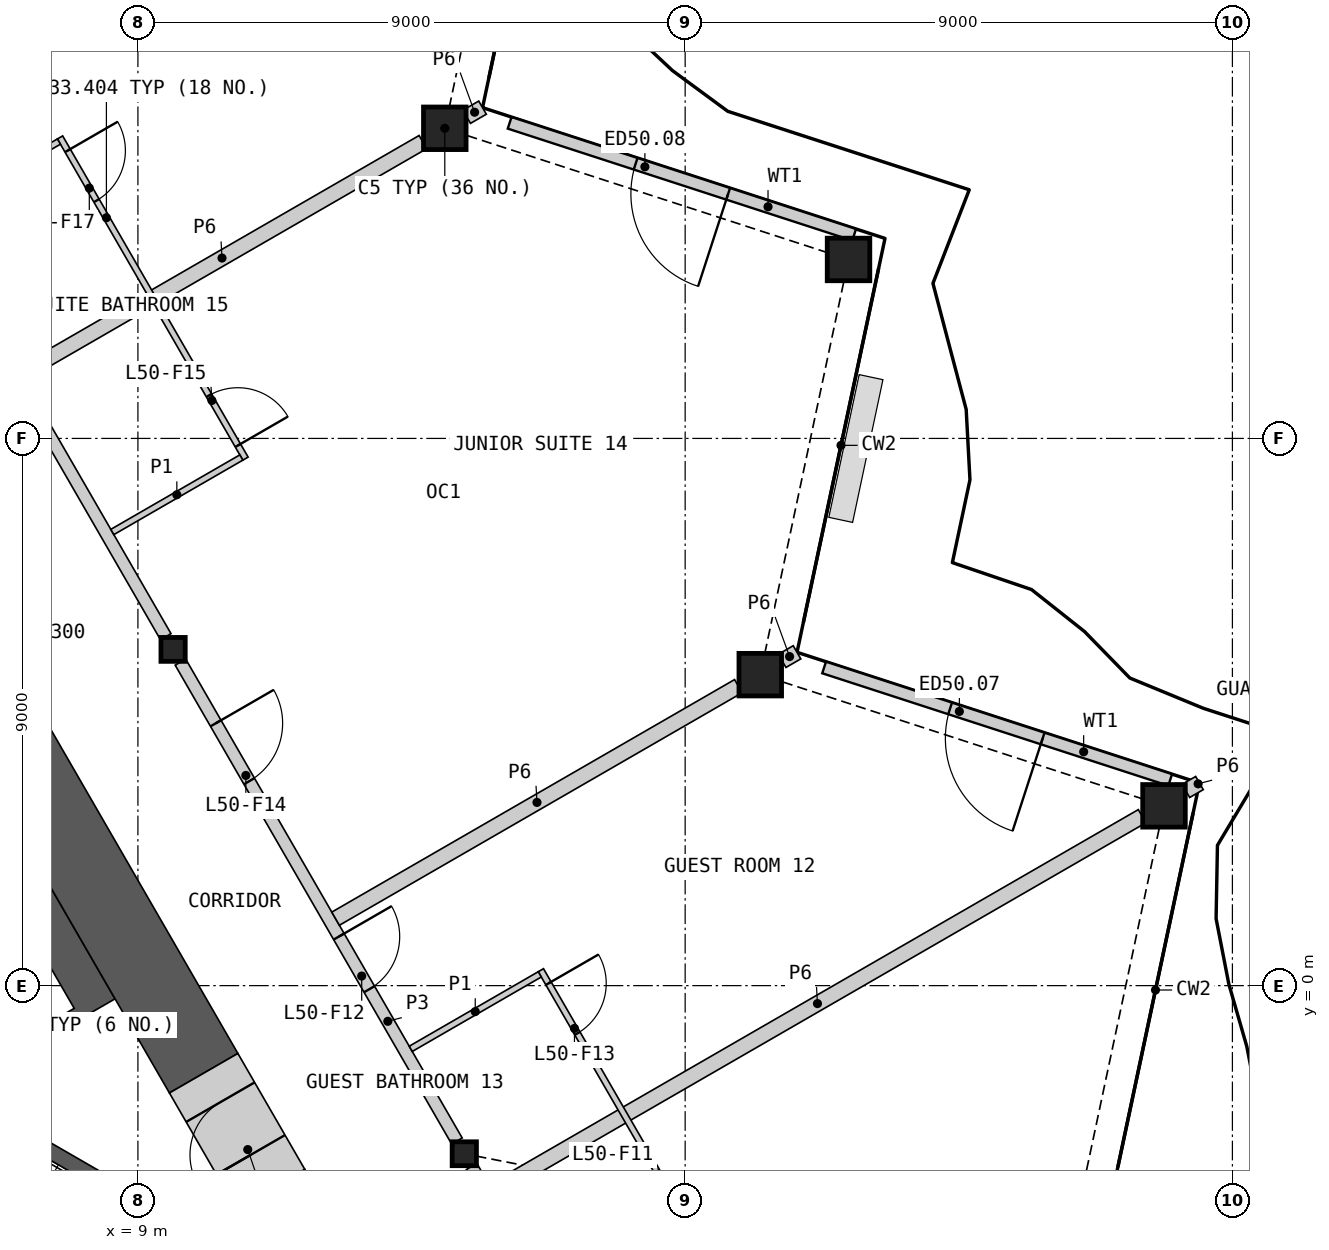
"""IFC4 building model, lengths in metres.
Left out: names, types, materials, properties, quantities, classifications, styles, units other than length and angle.
Written with IfcOpenShell. Run it as: python <this file> out.ifc"""

import sys

from ifc_helpers import new_model, si_unit, direction, frame, frame_2d, origin, origin_2d, place, context, subcontext, project, spatial, polyline, rectangle, hollow_rectangle, i_section, outline, extrude, element, fill, save


model = new_model("IFC4")
c1 = context("Model", 3, precision=1e-05, world=origin(), true_north=direction((0.0, 1.0)))
c2 = subcontext(c1, "Body", "Model", "MODEL_VIEW")
j1 = project(units=[si_unit("LENGTHUNIT", "METRE"), si_unit("PLANEANGLEUNIT", "RADIAN")], contexts=[c1])
p1 = place(None, origin())
s1 = spatial("IfcSite", under=j1, at=p1, CompositionType="ELEMENT")
p2 = place(p1, origin())
s2 = spatial("IfcBuilding", under=s1, at=p2, CompositionType="ELEMENT")
p3 = place(p2, frame((0.0, 0.0, 231.0)))
s3 = spatial("IfcBuildingStorey", under=s2, at=p3, CompositionType="ELEMENT", Elevation=231.0)
for number, where, z_axis, x_axis in (
    (1, (25.875, 2.957, 0.0), (0.0, 0.0, 1.0), (1.0, 0.0, 0.0)),
    (2, (19.235, 5.115, 0.0), (0.0, 0.0, 1.0), (1.0, 0.0, 0.0)),
    (3, (20.687, 11.943, 0.0), (0.0, 0.0, 1.0), (1.0, 0.0, 0.0)),
    (4, (14.047, 14.101, 0.0), (0.0, 0.0, 1.0), (1.0, 0.0, 0.0)),
):
    element("IfcColumn", number, at=place(p3, frame(where, z_axis=z_axis, x_axis=x_axis)), inside=s3, PredefinedType="COLUMN", context=c2, shape_type="SweptSolid", body=[
        extrude(hollow_rectangle(XDim=0.7, YDim=0.7, WallThickness=0.045, at=origin_2d()), origin(), (0.0, 0.0, 1.0), 3.6),
    ])
for number, where, z_axis, x_axis in (
    (5, (14.368, -2.765, 0.0), (0.0, 0.0, 1.0), (1.0, 0.0, 0.0)),
    (6, (9.578, 5.53, 0.0), (0.0, 0.0, 1.0), (1.0, 0.0, 0.0)),
):
    element("IfcColumn", number, at=place(p3, frame(where, z_axis=z_axis, x_axis=x_axis)), inside=s3, PredefinedType="COLUMN", context=c2, shape_type="SweptSolid", body=[
        extrude(i_section(OverallWidth=0.399, OverallDepth=0.393, WebThickness=0.023, FlangeThickness=0.037, at=origin_2d()), origin(), (0.0, 0.0, 1.0), 3.6),
    ])
p4 = place(p3, frame((25.977, 3.383, 0.0), z_axis=(0.0, 0.0, 1.0), x_axis=(-0.951062846307, 0.308997511922, 0.0)))
e7 = element("IfcWall", 7, at=p4, inside=s3, PredefinedType="SOLIDWALL", context=c2, shape_type="SweptSolid", body=[
    extrude(rectangle(XDim=5.984, YDim=0.2, at=frame_2d((2.992, 0.0))), origin(), (0.0, 0.0, 1.0), 2.701),
])
p5 = place(p4, frame((2.206, 0.0, 0.0)))
e8 = element("IfcOpeningElement", 8, at=p5, cuts=e7, PredefinedType="OPENING", context=c2, shape_type="SweptSolid", body=[
    extrude(rectangle(XDim=1.6, YDim=2.4, at=frame_2d((0.8, 1.2))), frame((0.0, 0.11, 0.0), z_axis=(0.0, -1.0, 0.0), x_axis=(1.0, 0.0, 0.0)), (0.0, 0.0, 1.0), 0.22),
])
p6 = place(p3, frame((20.779, 12.35, 0.0), z_axis=(0.0, 0.0, 1.0), x_axis=(-0.951065383831, 0.308989701572, 0.0)))
e9 = element("IfcWall", 9, at=p6, inside=s3, PredefinedType="SOLIDWALL", context=c2, shape_type="SweptSolid", body=[
    extrude(rectangle(XDim=5.958, YDim=0.2, at=frame_2d((2.979, 0.0))), origin(), (0.0, 0.0, 1.0), 2.701),
])
p7 = place(p6, frame((2.179, 0.0, 0.0)))
e10 = element("IfcOpeningElement", 10, at=p7, cuts=e9, PredefinedType="OPENING", context=c2, shape_type="SweptSolid", body=[
    extrude(rectangle(XDim=1.6, YDim=2.4, at=frame_2d((0.8, 1.2))), frame((0.0, 0.11, 0.0), z_axis=(0.0, -1.0, 0.0), x_axis=(1.0, 0.0, 0.0)), (0.0, 0.0, 1.0), 0.22),
])
p8 = place(p3, origin())
e11 = element("IfcWall", 11, at=p8, inside=s3, PredefinedType="SHEAR", context=c2, shape_type="SweptSolid", body=[
    extrude(outline(polyline([(6.324, 3.767), (8.624, -0.217), (8.231, -0.444), (6.061, -1.697), (5.96, -1.524), (7.952, -0.374), (5.852, 3.263), (3.861, 2.113), (3.76, 2.287), (5.931, 3.54), (6.324, 3.767)])), origin(), (0.0, 0.0, 1.0), 3.25),
])
p9 = place(p3, origin())
e12 = element("IfcWall", 12, at=p9, inside=s3, PredefinedType="SHEAR", context=c2, shape_type="SweptSolid", body=[
    extrude(outline(polyline([(10.032, -4.298), (10.374, -4.206), (5.307, -1.281), (5.182, -1.498), (10.032, -4.298)])), origin(), (0.0, 0.0, 1.0), 3.25),
])
p10 = place(p3, frame((10.081, -1.441, 0.0), z_axis=(0.0, 0.0, 1.0), x_axis=(-0.500012180433, 0.866018371294, 0.0)))
e13 = element("IfcWall", 13, at=p10, inside=s3, PredefinedType="SHEAR", context=c2, shape_type="SweptSolid", body=[
    extrude(rectangle(XDim=15.05, YDim=1.3, at=frame_2d((7.525, 0.0))), origin(), (0.0, 0.0, 1.0), 3.25),
])
p11 = place(p3, frame((13.311, -7.035, 0.0), z_axis=(0.0, 0.0, 1.0), x_axis=(-0.500003555838, 0.866023350811, 0.0)))
e14 = element("IfcWall", 14, at=p11, inside=s3, PredefinedType="SHEAR", context=c2, shape_type="SweptSolid", body=[
    extrude(rectangle(XDim=4.26, YDim=1.3, at=frame_2d((2.13, 0.0))), origin(), (0.0, 0.0, 1.0), 3.25),
])
p12 = place(p3, frame((11.181, -3.346, 0.0), z_axis=(0.0, 0.0, 1.0), x_axis=(-0.499946605688, 0.86605622881, 0.0)))
e15 = element("IfcWall", 15, at=p12, inside=s3, PredefinedType="SHEAR", context=c2, shape_type="SweptSolid", body=[
    extrude(rectangle(XDim=2.2, YDim=1.3, at=frame_2d((1.1, 0.0))), origin(), (0.0, 0.0, 1.0), 3.25),
])
p13 = place(p12, frame((0.65, 0.0, 0.0)))
e16 = element("IfcOpeningElement", 16, at=p13, cuts=e15, PredefinedType="OPENING", context=c2, shape_type="SweptSolid", body=[
    extrude(rectangle(XDim=1.0, YDim=2.1, at=frame_2d((0.5, 1.05))), frame((0.0, 0.66, 0.0), z_axis=(0.0, -1.0, 0.0), x_axis=(1.0, 0.0, 0.0)), (0.0, 0.0, 1.0), 1.32),
])
p14 = place(p3, frame((14.837, -3.378, 0.0), z_axis=(0.0, 0.0, 1.0), x_axis=(0.866021706022, 0.500006404657, 0.0)))
e17 = element("IfcWall", 17, at=p14, inside=s3, PredefinedType="PARTITIONING", context=c2, shape_type="SweptSolid", body=[
    extrude(rectangle(XDim=12.33, YDim=0.25, at=frame_2d((6.165, 0.0))), origin(), (0.0, 0.0, 1.0), 2.404),
])
p15 = place(p3, frame((9.699, 5.321, 0.0), z_axis=(0.0, 0.0, 1.0), x_axis=(0.49998193945, -0.866035830797, 0.0)))
e18 = element("IfcWall", 18, at=p15, inside=s3, PredefinedType="PARTITIONING", context=c2, shape_type="SweptSolid", body=[
    extrude(rectangle(XDim=9.094, YDim=0.2, at=frame_2d((4.547, 0.0))), origin(), (0.0, 0.0, 1.0), 3.25),
])
p16 = place(p15, frame((5.212, 0.0, 0.0)))
e19 = element("IfcOpeningElement", 19, at=p16, cuts=e18, PredefinedType="OPENING", context=c2, shape_type="SweptSolid", body=[
    extrude(rectangle(XDim=1.0, YDim=2.1, at=frame_2d((0.5, 1.05))), frame((0.0, 0.11, 0.0), z_axis=(0.0, -1.0, 0.0), x_axis=(1.0, 0.0, 0.0)), (0.0, 0.0, 1.0), 0.22),
])
p17 = place(p15, frame((1.162, 0.0, 0.0)))
e20 = element("IfcOpeningElement", 20, at=p17, cuts=e18, PredefinedType="OPENING", context=c2, shape_type="SweptSolid", body=[
    extrude(rectangle(XDim=1.1, YDim=2.1, at=frame_2d((0.55, 1.05))), frame((0.0, 0.11, 0.0), z_axis=(0.0, -1.0, 0.0), x_axis=(1.0, 0.0, 0.0)), (0.0, 0.0, 1.0), 0.22),
])
p18 = place(p3, frame((4.91, 13.616, 0.0), z_axis=(0.0, 0.0, 1.0), x_axis=(0.50000207303, -0.866024206917, 0.0)))
e21 = element("IfcWall", 21, at=p18, inside=s3, PredefinedType="PARTITIONING", context=c2, shape_type="SweptSolid", body=[
    extrude(rectangle(XDim=9.095, YDim=0.2, at=frame_2d((4.547, 0.0))), origin(), (0.0, 0.0, 1.0), 3.25),
])
p19 = place(p3, frame((12.251, 1.101, 0.0), z_axis=(0.0, 0.0, 1.0), x_axis=(0.866020808234, 0.500007959642, 0.0)))
e22 = element("IfcWall", 22, at=p19, inside=s3, PredefinedType="PARTITIONING", context=c2, shape_type="SweptSolid", body=[
    extrude(rectangle(XDim=7.649, YDim=0.25, at=frame_2d((3.824, 0.0))), origin(), (0.0, 0.0, 1.0), 2.404),
])
p20 = place(p3, frame((7.079, 10.059, 0.0), z_axis=(0.0, 0.0, 1.0), x_axis=(0.866033195618, 0.499986503906, 0.0)))
e23 = element("IfcWall", 23, at=p20, inside=s3, PredefinedType="PARTITIONING", context=c2, shape_type="SweptSolid", body=[
    extrude(rectangle(XDim=7.63, YDim=0.25, at=frame_2d((3.815, 0.0))), origin(), (0.0, 0.0, 1.0), 2.404),
])
p21 = place(p3, frame((14.489, -2.975, 0.0), z_axis=(0.0, 0.0, 1.0), x_axis=(0.500017753321, -0.866015153657, 0.0)))
e24 = element("IfcWall", 24, at=p21, inside=s3, PredefinedType="PARTITIONING", context=c2, shape_type="SweptSolid", body=[
    extrude(rectangle(XDim=5.51, YDim=0.2, at=frame_2d((2.755, 0.0))), origin(), (0.0, 0.0, 1.0), 3.25),
])
p22 = place(p21, frame((4.01, 0.0, 0.0)))
e25 = element("IfcOpeningElement", 25, at=p22, cuts=e24, PredefinedType="OPENING", context=c2, shape_type="SweptSolid", body=[
    extrude(rectangle(XDim=1.1, YDim=2.1, at=frame_2d((0.55, 1.05))), frame((0.0, 0.11, 0.0), z_axis=(0.0, -1.0, 0.0), x_axis=(1.0, 0.0, 0.0)), (0.0, 0.0, 1.0), 0.22),
])
p23 = place(p3, frame((14.407, 14.29, 0.0), z_axis=(0.0, 0.0, 1.0), x_axis=(0.865888485494, 0.500237074485, 0.0)))
e26 = element("IfcWall", 26, at=p23, inside=s3, PredefinedType="PARTITIONING", context=c2, shape_type="SweptSolid", body=[
    extrude(rectangle(XDim=0.301, YDim=0.25, at=frame_2d((0.15, 0.0))), origin(), (0.0, 0.0, 1.0), 2.404),
])
p24 = place(p3, frame((19.595, 5.341, 0.0), z_axis=(0.0, 0.0, 1.0), x_axis=(0.865998287773, 0.500046963369, 0.0)))
e27 = element("IfcWall", 27, at=p24, inside=s3, PredefinedType="PARTITIONING", context=c2, shape_type="SweptSolid", body=[
    extrude(rectangle(XDim=0.282, YDim=0.25, at=frame_2d((0.141, 0.0))), origin(), (0.0, 0.0, 1.0), 2.404),
])
p25 = place(p3, frame((26.235, 3.203, 0.0), z_axis=(0.0, 0.0, 1.0), x_axis=(0.86596515875, 0.500104332946, 0.0)))
e28 = element("IfcWall", 28, at=p25, inside=s3, PredefinedType="PARTITIONING", context=c2, shape_type="SweptSolid", body=[
    extrude(rectangle(XDim=0.258, YDim=0.25, at=frame_2d((0.129, 0.0))), origin(), (0.0, 0.0, 1.0), 2.404),
])
p26 = place(p3, frame((7.719, 13.95, 0.0), z_axis=(0.0, 0.0, 1.0), x_axis=(0.500008851346, -0.866020293397, 0.0)))
e29 = element("IfcWall", 29, at=p26, inside=s3, PredefinedType="PARTITIONING", context=c2, shape_type="SweptSolid", body=[
    extrude(rectangle(XDim=6.1, YDim=0.1, at=frame_2d((3.05, 0.0))), origin(), (0.0, 0.0, 1.0), 2.404),
])
p27 = place(p26, frame((4.9, 0.0, 0.0)))
e30 = element("IfcOpeningElement", 30, at=p27, cuts=e29, PredefinedType="OPENING", context=c2, shape_type="SweptSolid", body=[
    extrude(rectangle(XDim=0.95, YDim=2.1, at=frame_2d((0.475, 1.05))), frame((0.0, 0.06, 0.0), z_axis=(0.0, -1.0, 0.0), x_axis=(1.0, 0.0, 0.0)), (0.0, 0.0, 1.0), 0.12),
])
p28 = place(p26, frame((0.25, 0.0, 0.0)))
e31 = element("IfcOpeningElement", 31, at=p28, cuts=e29, PredefinedType="OPENING", context=c2, shape_type="SweptSolid", body=[
    extrude(rectangle(XDim=0.95, YDim=2.1, at=frame_2d((0.475, 1.05))), frame((0.0, 0.06, 0.0), z_axis=(0.0, -1.0, 0.0), x_axis=(1.0, 0.0, 0.0)), (0.0, 0.0, 1.0), 0.12),
])
p29 = place(p3, frame((15.627, 0.254, 0.0), z_axis=(0.0, 0.0, 1.0), x_axis=(0.500027264788, -0.866009661879, 0.0)))
e32 = element("IfcWall", 32, at=p29, inside=s3, PredefinedType="PARTITIONING", context=c2, shape_type="SweptSolid", body=[
    extrude(rectangle(XDim=5.2, YDim=0.1, at=frame_2d((2.6, 0.0))), origin(), (0.0, 0.0, 1.0), 2.404),
])
p30 = place(p29, frame((4.0, 0.0, 0.0)))
e33 = element("IfcOpeningElement", 33, at=p30, cuts=e32, PredefinedType="OPENING", context=c2, shape_type="SweptSolid", body=[
    extrude(rectangle(XDim=0.95, YDim=2.1, at=frame_2d((0.475, 1.05))), frame((0.0, 0.06, 0.0), z_axis=(0.0, -1.0, 0.0), x_axis=(1.0, 0.0, 0.0)), (0.0, 0.0, 1.0), 0.12),
])
p31 = place(p29, frame((0.25, 0.0, 0.0)))
e34 = element("IfcOpeningElement", 34, at=p31, cuts=e32, PredefinedType="OPENING", context=c2, shape_type="SweptSolid", body=[
    extrude(rectangle(XDim=0.95, YDim=2.1, at=frame_2d((0.475, 1.05))), frame((0.0, 0.06, 0.0), z_axis=(0.0, -1.0, 0.0), x_axis=(1.0, 0.0, 0.0)), (0.0, 0.0, 1.0), 0.12),
])
p32 = place(p3, frame((13.487, -1.04, 0.0), z_axis=(0.0, 0.0, 1.0), x_axis=(0.866032905446, 0.499987006516, 0.0)))
e35 = element("IfcWall", 35, at=p32, inside=s3, PredefinedType="PARTITIONING", context=c2, shape_type="SweptSolid", body=[
    extrude(rectangle(XDim=2.45, YDim=0.1, at=frame_2d((1.225, 0.0))), origin(), (0.0, 0.0, 1.0), 2.404),
])
p33 = place(p3, frame((8.579, 7.461, 0.0), z_axis=(0.0, 0.0, 1.0), x_axis=(0.866014668023, 0.500018594424, 0.0)))
e36 = element("IfcWall", 36, at=p33, inside=s3, PredefinedType="PARTITIONING", context=c2, shape_type="SweptSolid", body=[
    extrude(rectangle(XDim=2.45, YDim=0.1, at=frame_2d((1.225, 0.0))), origin(), (0.0, 0.0, 1.0), 2.404),
])
p34 = place(p3, frame((5.579, 12.657, 0.0), z_axis=(0.0, 0.0, 1.0), x_axis=(0.866057815567, 0.499943856944, 0.0)))
e37 = element("IfcWall", 37, at=p34, inside=s3, PredefinedType="PARTITIONING", context=c2, shape_type="SweptSolid", body=[
    extrude(rectangle(XDim=2.45, YDim=0.1, at=frame_2d((1.225, 0.0))), origin(), (0.0, 0.0, 1.0), 2.404),
])
p35 = place(p5, origin())
e38 = element("IfcDoor", 38, at=p35, inside=s3, OperationType="DOUBLE_DOOR_SINGLE_SWING", PredefinedType="DOOR", context=c2, shape_type="SweptSolid", body=[
    extrude(rectangle(XDim=1.6, YDim=2.4, at=frame_2d((0.8, 1.2))), frame((0.0, 0.025, 0.0), z_axis=(0.0, -1.0, 0.0), x_axis=(1.0, 0.0, 0.0)), (0.0, 0.0, 1.0), 0.05),
])
fill(e8, e38)
p36 = place(p7, origin())
e39 = element("IfcDoor", 39, at=p36, inside=s3, OperationType="DOUBLE_DOOR_SINGLE_SWING", PredefinedType="DOOR", context=c2, shape_type="SweptSolid", body=[
    extrude(rectangle(XDim=1.6, YDim=2.4, at=frame_2d((0.8, 1.2))), frame((0.0, 0.025, 0.0), z_axis=(0.0, -1.0, 0.0), x_axis=(1.0, 0.0, 0.0)), (0.0, 0.0, 1.0), 0.05),
])
fill(e10, e39)
p37 = place(p13, origin())
e40 = element("IfcDoor", 40, at=p37, inside=s3, OperationType="SINGLE_SWING_LEFT", PredefinedType="DOOR", context=c2, shape_type="SweptSolid", body=[
    extrude(rectangle(XDim=1.0, YDim=2.1, at=frame_2d((0.5, 1.05))), frame((0.0, 0.405, 0.0), z_axis=(0.0, -1.0, 0.0), x_axis=(1.0, 0.0, 0.0)), (0.0, 0.0, 1.0), 0.05),
])
fill(e16, e40)
p38 = place(p16, origin())
e41 = element("IfcDoor", 41, at=p38, inside=s3, OperationType="SINGLE_SWING_LEFT", PredefinedType="DOOR", context=c2, shape_type="SweptSolid", body=[
    extrude(rectangle(XDim=1.0, YDim=2.1, at=frame_2d((0.5, 1.05))), frame((0.0, 0.025, 0.0), z_axis=(0.0, -1.0, 0.0), x_axis=(1.0, 0.0, 0.0)), (0.0, 0.0, 1.0), 0.05),
])
fill(e19, e41)
p39 = place(p31, origin())
e42 = element("IfcDoor", 42, at=p39, inside=s3, OperationType="SINGLE_SWING_LEFT", PredefinedType="DOOR", context=c2, shape_type="SweptSolid", body=[
    extrude(rectangle(XDim=0.95, YDim=2.1, at=frame_2d((0.475, 1.05))), frame((0.0, 0.025, 0.0), z_axis=(0.0, -1.0, 0.0), x_axis=(1.0, 0.0, 0.0)), (0.0, 0.0, 1.0), 0.05),
])
fill(e34, e42)
p40 = place(p17, origin())
e43 = element("IfcDoor", 43, at=p40, inside=s3, OperationType="SINGLE_SWING_LEFT", PredefinedType="DOOR", context=c2, shape_type="SweptSolid", body=[
    extrude(rectangle(XDim=1.1, YDim=2.1, at=frame_2d((0.55, 1.05))), frame((0.0, 0.025, 0.0), z_axis=(0.0, -1.0, 0.0), x_axis=(1.0, 0.0, 0.0)), (0.0, 0.0, 1.0), 0.05),
])
fill(e20, e43)
p41 = place(p27, origin())
e44 = element("IfcDoor", 44, at=p41, inside=s3, OperationType="SINGLE_SWING_RIGHT", PredefinedType="DOOR", context=c2, shape_type="SweptSolid", body=[
    extrude(rectangle(XDim=0.95, YDim=2.1, at=frame_2d((0.475, 1.05))), frame((0.0, 0.025, 0.0), z_axis=(0.0, -1.0, 0.0), x_axis=(1.0, 0.0, 0.0)), (0.0, 0.0, 1.0), 0.05),
])
fill(e30, e44)
p42 = place(p28, origin())
e45 = element("IfcDoor", 45, at=p42, inside=s3, OperationType="SINGLE_SWING_LEFT", PredefinedType="DOOR", context=c2, shape_type="SweptSolid", body=[
    extrude(rectangle(XDim=0.95, YDim=2.1, at=frame_2d((0.475, 1.05))), frame((0.0, 0.025, 0.0), z_axis=(0.0, -1.0, 0.0), x_axis=(1.0, 0.0, 0.0)), (0.0, 0.0, 1.0), 0.05),
])
fill(e31, e45)
save(model, sys.argv[1])
